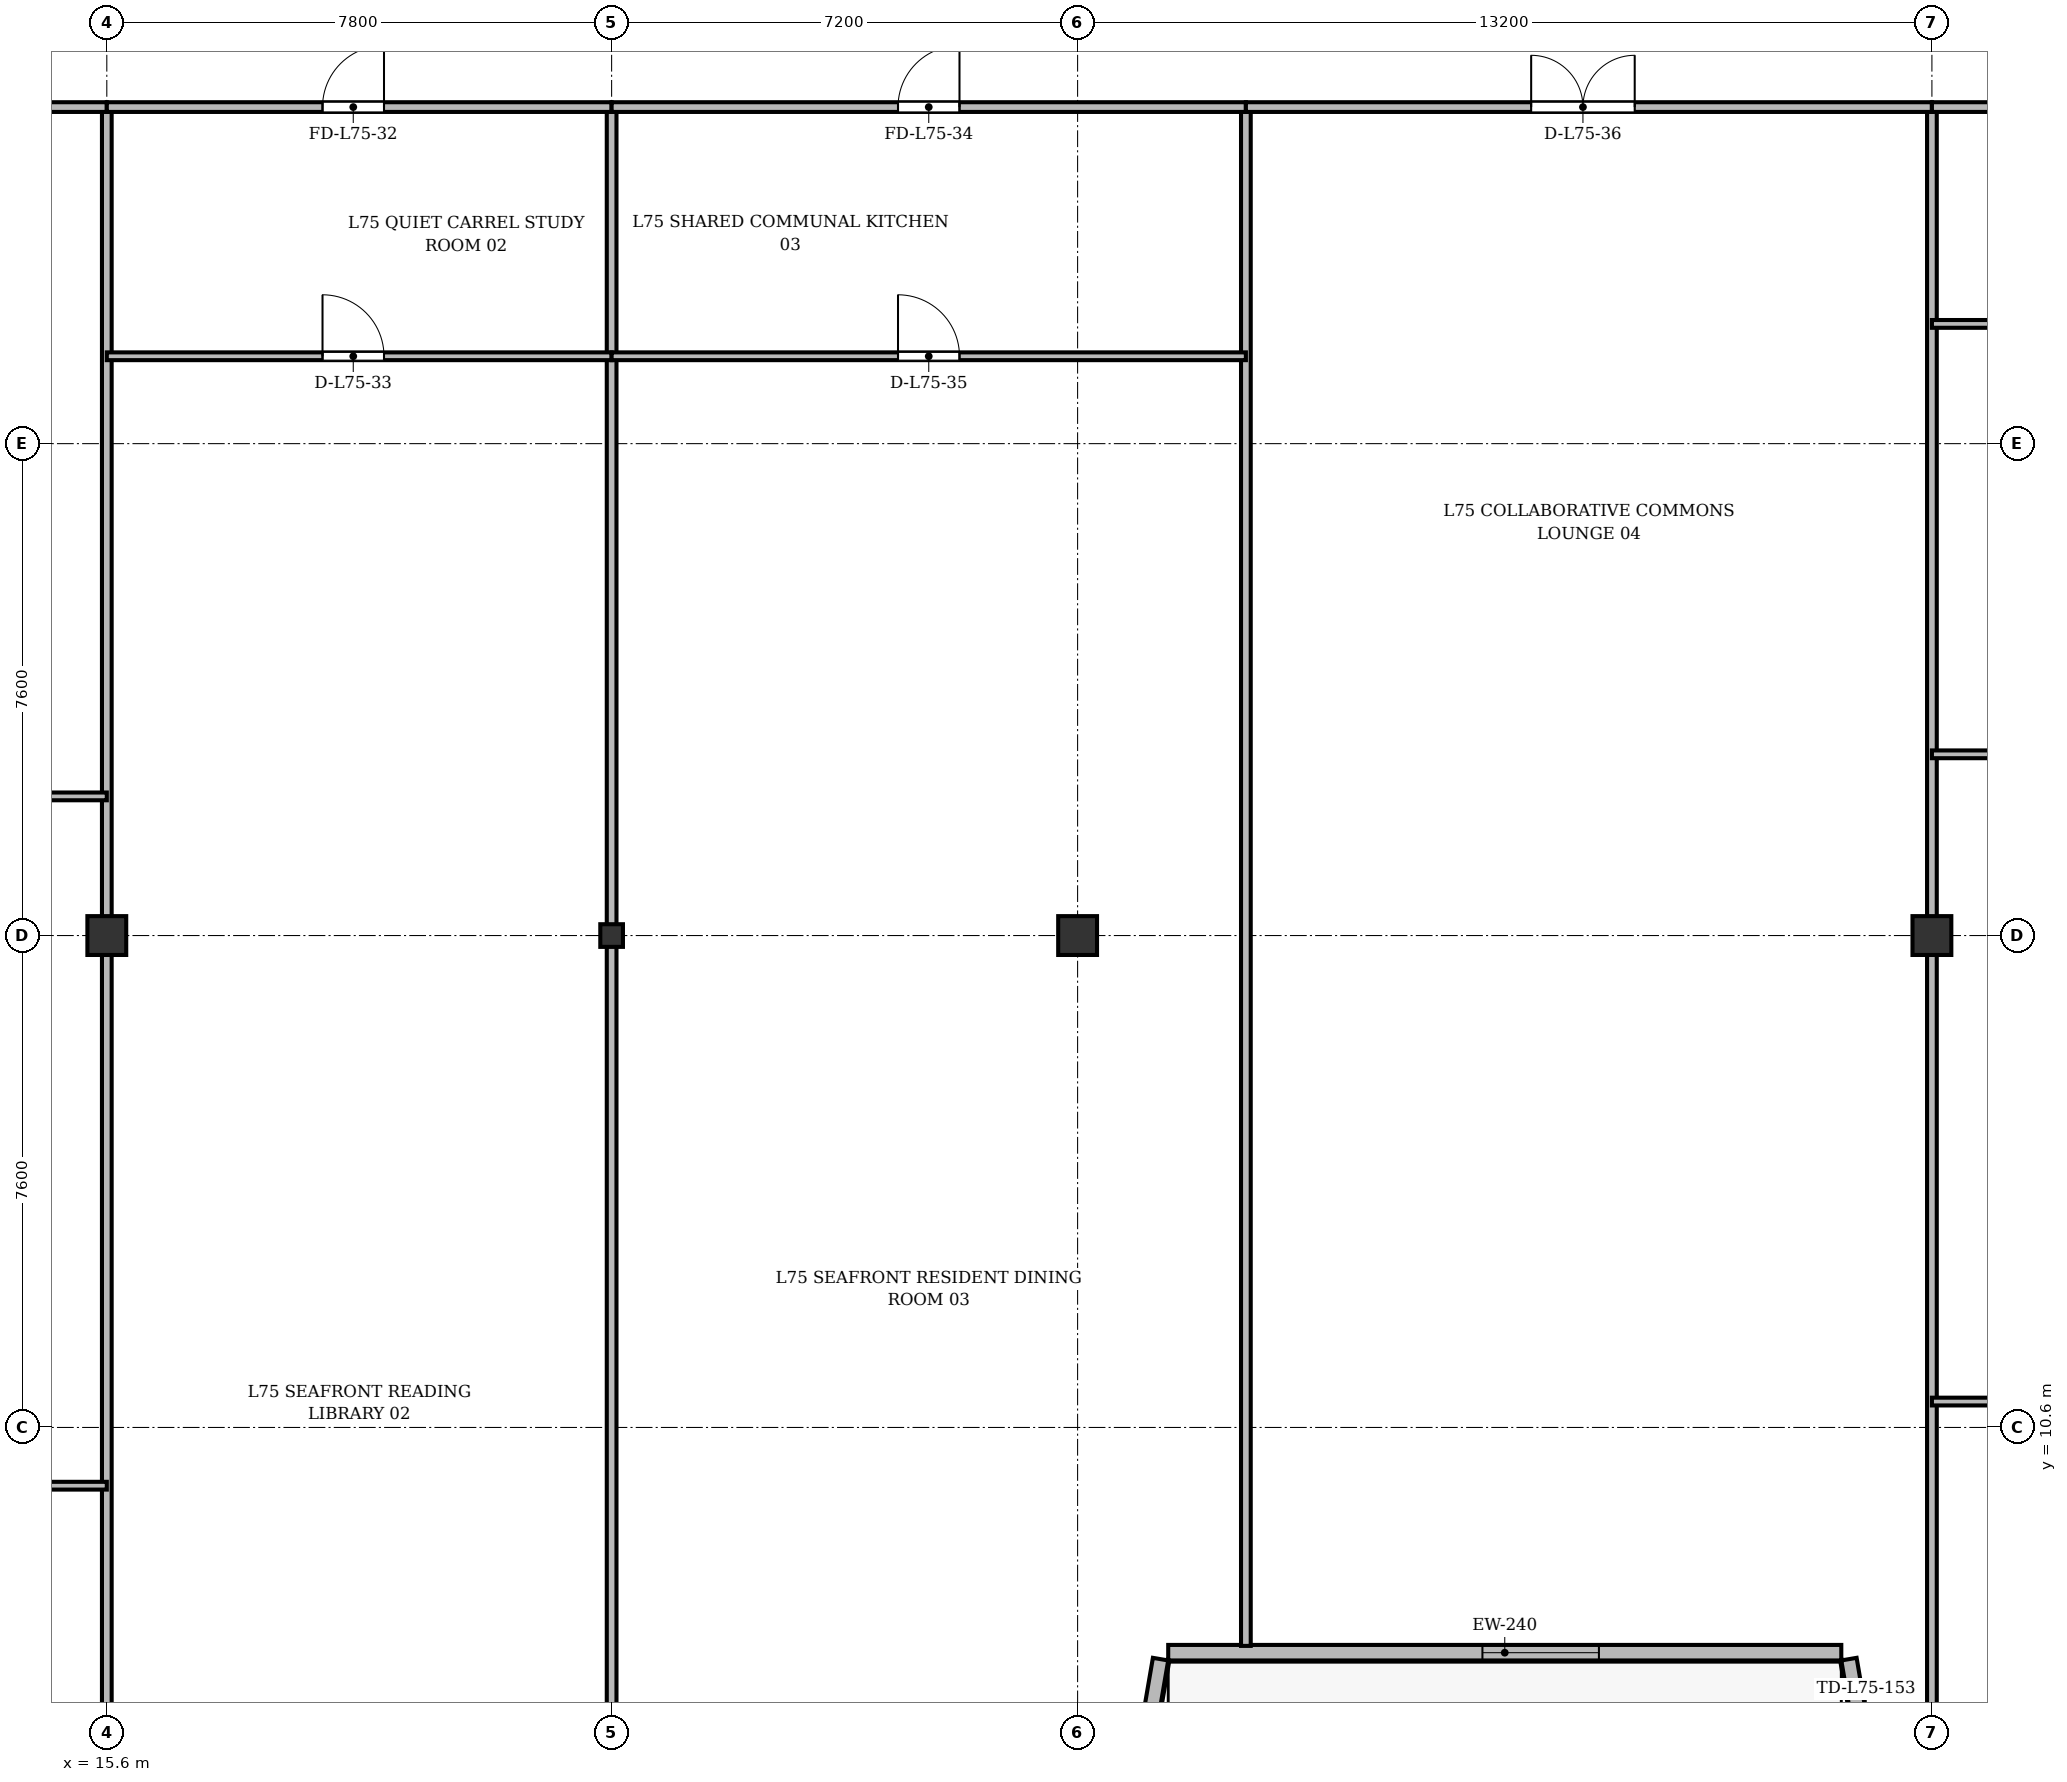
"""IFC4 building model, lengths in metres.
Left out: names, types, materials, properties, quantities, classifications, styles, units other than length and angle.
Written with IfcOpenShell. Run it as: python <this file> out.ifc"""

import sys

from ifc_helpers import new_model, si_unit, direction, frame, frame_2d, origin, origin_2d, place, context, subcontext, project, spatial, rectangle, i_section, extrude, source, transform, mapped, element, fill, save


model = new_model("IFC4")
c1 = context("Model", 3, precision=1e-05, world=origin(), true_north=direction((0.0, 1.0)))
c2 = subcontext(c1, "Body", "Model", "MODEL_VIEW")
j1 = project(units=[si_unit("LENGTHUNIT", "METRE"), si_unit("PLANEANGLEUNIT", "RADIAN")], contexts=[c1])
p1 = place(None, origin())
s1 = spatial("IfcSite", under=j1, at=p1, CompositionType="ELEMENT")
p2 = place(p1, origin())
s2 = spatial("IfcBuilding", under=s1, at=p2, CompositionType="ELEMENT")
p3 = place(p2, frame((0.0, 0.0, 288.3)))
s3 = spatial("IfcBuildingStorey", under=s2, at=p3, CompositionType="ELEMENT", Elevation=288.3)
m1 = source(origin(), c2, "Body", "SweptSolid", [
    extrude(rectangle(XDim=0.6, YDim=0.6, at=origin_2d()), origin(), (0.0, 0.0, 1.0), 3.6),
])
p4 = place(p3, frame((15.6, 18.2, 0.0), z_axis=(0.0, 0.0, 1.0), x_axis=(1.0, 0.0, 0.0)))
e1 = element("IfcColumn", 1, at=p4, inside=s3, PredefinedType="COLUMN", context=c2, shape_type="MappedRepresentation", body=[
    mapped(m1, transform((0.0, 0.0, 0.0), x_axis=(1.0, 0.0, 0.0), y_axis=(0.0, 1.0, 0.0), z_axis=(0.0, 0.0, 1.0), scale=1.0)),
])
m2 = source(origin(), c2, "Body", "SweptSolid", [
    extrude(i_section(OverallWidth=0.35, OverallDepth=0.35, WebThickness=0.018, FlangeThickness=0.028, at=origin_2d()), origin(), (0.0, 0.0, 1.0), 3.6),
])
p5 = place(p3, frame((23.4, 18.2, 0.0), z_axis=(0.0, 0.0, 1.0), x_axis=(1.0, 0.0, 0.0)))
e2 = element("IfcColumn", 2, at=p5, inside=s3, PredefinedType="COLUMN", context=c2, shape_type="MappedRepresentation", body=[
    mapped(m2, transform((0.0, 0.0, 0.0), x_axis=(1.0, 0.0, 0.0), y_axis=(0.0, 1.0, 0.0), z_axis=(0.0, 0.0, 1.0), scale=1.0)),
])
for number, where, z_axis, x_axis in (
    (3, (30.6, 18.2, 0.0), (0.0, 0.0, 1.0), (1.0, 0.0, 0.0)),
    (4, (43.8, 18.2, 0.0), (0.0, 0.0, 1.0), (1.0, 0.0, 0.0)),
):
    element("IfcColumn", number, at=place(p3, frame(where, z_axis=z_axis, x_axis=x_axis)), inside=s3, PredefinedType="COLUMN", context=c2, shape_type="MappedRepresentation", body=[
        mapped(m1, transform((0.0, 0.0, 0.0), x_axis=(1.0, 0.0, 0.0), y_axis=(0.0, 1.0, 0.0), z_axis=(0.0, 0.0, 1.0), scale=1.0)),
    ])
p6 = place(p3, frame((43.118, 3.52, 0.0), z_axis=(0.0, 0.0, 1.0), x_axis=(-0.168990530437, 0.98561767467, 0.0)))
e5 = element("IfcWall", 5, at=p6, inside=s3, PredefinedType="SOLIDWALL", context=c2, shape_type="SweptSolid", body=[
    extrude(rectangle(XDim=3.551, YDim=0.24, at=frame_2d((1.775, 0.0))), origin(), (0.0, 0.0, 1.0), 2.92),
])
p7 = place(p6, frame((1.374, 0.0, 0.0)))
e6 = element("IfcOpeningElement", 6, at=p7, cuts=e5, PredefinedType="OPENING", context=c2, shape_type="SweptSolid", body=[
    extrude(rectangle(XDim=1.2, YDim=2.2, at=frame_2d((0.6, 1.1))), frame((0.0, 0.13, 0.0), z_axis=(0.0, -1.0, 0.0), x_axis=(1.0, 0.0, 0.0)), (0.0, 0.0, 1.0), 0.26),
])
p8 = place(p3, frame((42.4, 7.12, 0.0), z_axis=(0.0, 0.0, 1.0), x_axis=(-1.0, 0.0, 0.0)))
e7 = element("IfcWall", 7, at=p8, inside=s3, PredefinedType="SOLIDWALL", context=c2, shape_type="SweptSolid", body=[
    extrude(rectangle(XDim=10.4, YDim=0.24, at=frame_2d((5.2, 0.0))), origin(), (0.0, 0.0, 1.0), 3.37),
])
p9 = place(p8, frame((3.745, 0.0, 0.9)))
e8 = element("IfcOpeningElement", 8, at=p9, cuts=e7, PredefinedType="OPENING", context=c2, shape_type="SweptSolid", body=[
    extrude(rectangle(XDim=1.8, YDim=1.8, at=frame_2d((0.9, 0.9))), frame((0.0, 0.13, 0.0), z_axis=(0.0, -1.0, 0.0), x_axis=(1.0, 0.0, 0.0)), (0.0, 0.0, 1.0), 0.26),
])
p10 = place(p3, frame((31.882, 7.02, 0.0), z_axis=(0.0, 0.0, 1.0), x_axis=(-0.168923741424, -0.98562912375, 0.0)))
e9 = element("IfcWall", 9, at=p10, inside=s3, PredefinedType="SOLIDWALL", context=c2, shape_type="SweptSolid", body=[
    extrude(rectangle(XDim=3.551, YDim=0.24, at=frame_2d((1.775, 0.0))), origin(), (0.0, 0.0, 1.0), 2.92),
])
for number, where, z_axis, x_axis in (
    (10, (15.6, 3.725, 0.0), (0.0, 0.0, 1.0), (0.0, 1.0, 0.0)),
    (11, (23.4, 3.725, 0.0), (0.0, 0.0, 1.0), (0.0, 1.0, 0.0)),
):
    element("IfcWall", number, at=place(p3, frame(where, z_axis=z_axis, x_axis=x_axis)), inside=s3, PredefinedType="PARTITIONING", context=c2, shape_type="SweptSolid", body=[
        extrude(rectangle(XDim=27.275, YDim=0.15, at=frame_2d((13.637, 0.0))), origin(), (0.0, 0.0, 1.0), 2.87),
    ])
p11 = place(p3, frame((33.2, 7.225, 0.0), z_axis=(0.0, 0.0, 1.0), x_axis=(0.0, 1.0, 0.0)))
e12 = element("IfcWall", 12, at=p11, inside=s3, PredefinedType="PARTITIONING", context=c2, shape_type="SweptSolid", body=[
    extrude(rectangle(XDim=23.775, YDim=0.15, at=frame_2d((11.887, 0.0))), origin(), (0.0, 0.0, 1.0), 2.92),
])
p12 = place(p3, frame((43.8, 3.725, 0.0), z_axis=(0.0, 0.0, 1.0), x_axis=(0.0, 1.0, 0.0)))
e13 = element("IfcWall", 13, at=p12, inside=s3, PredefinedType="PARTITIONING", context=c2, shape_type="SweptSolid", body=[
    extrude(rectangle(XDim=27.275, YDim=0.15, at=frame_2d((13.637, 0.0))), origin(), (0.0, 0.0, 1.0), 2.87),
])
p13 = place(p3, frame((8.44, 20.35, 0.0), z_axis=(0.0, 0.0, 1.0), x_axis=(1.0, 0.0, 0.0)))
e14 = element("IfcWall", 14, at=p13, inside=s3, PredefinedType="PARTITIONING", context=c2, shape_type="SweptSolid", body=[
    extrude(rectangle(XDim=7.16, YDim=0.12, at=frame_2d((3.58, 0.0))), origin(), (0.0, 0.0, 1.0), 2.87),
])
p14 = place(p13, frame((3.105, 0.0, 0.0)))
e15 = element("IfcOpeningElement", 15, at=p14, cuts=e14, PredefinedType="OPENING", context=c2, shape_type="SweptSolid", body=[
    extrude(rectangle(XDim=0.95, YDim=2.15, at=frame_2d((0.475, 1.075))), frame((0.0, 0.07, 0.0), z_axis=(0.0, -1.0, 0.0), x_axis=(1.0, 0.0, 0.0)), (0.0, 0.0, 1.0), 0.14),
])
p15 = place(p3, frame((8.425, 31.0, 0.0), z_axis=(0.0, 0.0, 1.0), x_axis=(1.0, 0.0, 0.0)))
e16 = element("IfcWall", 16, at=p15, inside=s3, PredefinedType="PARTITIONING", context=c2, shape_type="SweptSolid", body=[
    extrude(rectangle(XDim=7.175, YDim=0.15, at=frame_2d((3.587, 0.0))), origin(), (0.0, 0.0, 1.0), 2.87),
])
p16 = place(p15, frame((4.681, 0.0, 0.0)))
e17 = element("IfcOpeningElement", 17, at=p16, cuts=e16, PredefinedType="OPENING", context=c2, shape_type="SweptSolid", body=[
    extrude(rectangle(XDim=0.95, YDim=2.15, at=frame_2d((0.475, 1.075))), frame((0.0, 0.085, 0.0), z_axis=(0.0, -1.0, 0.0), x_axis=(1.0, 0.0, 0.0)), (0.0, 0.0, 1.0), 0.17),
])
p17 = place(p3, frame((8.44, 9.7, 0.0), z_axis=(0.0, 0.0, 1.0), x_axis=(1.0, 0.0, 0.0)))
e18 = element("IfcWall", 18, at=p17, inside=s3, PredefinedType="PARTITIONING", context=c2, shape_type="SweptSolid", body=[
    extrude(rectangle(XDim=7.16, YDim=0.12, at=frame_2d((3.58, 0.0))), origin(), (0.0, 0.0, 1.0), 2.87),
])
p18 = place(p17, frame((3.105, 0.0, 0.0)))
e19 = element("IfcOpeningElement", 19, at=p18, cuts=e18, PredefinedType="OPENING", context=c2, shape_type="SweptSolid", body=[
    extrude(rectangle(XDim=0.95, YDim=2.15, at=frame_2d((0.475, 1.075))), frame((0.0, 0.07, 0.0), z_axis=(0.0, -1.0, 0.0), x_axis=(1.0, 0.0, 0.0)), (0.0, 0.0, 1.0), 0.14),
])
p19 = place(p3, frame((15.6, 31.0, 0.0), z_axis=(0.0, 0.0, 1.0), x_axis=(1.0, 0.0, 0.0)))
e20 = element("IfcWall", 20, at=p19, inside=s3, PredefinedType="PARTITIONING", context=c2, shape_type="SweptSolid", body=[
    extrude(rectangle(XDim=7.8, YDim=0.15, at=frame_2d((3.9, 0.0))), origin(), (0.0, 0.0, 1.0), 2.87),
])
p20 = place(p19, frame((3.333, 0.0, 0.0)))
e21 = element("IfcOpeningElement", 21, at=p20, cuts=e20, PredefinedType="OPENING", context=c2, shape_type="SweptSolid", body=[
    extrude(rectangle(XDim=0.95, YDim=2.15, at=frame_2d((0.475, 1.075))), frame((0.0, 0.085, 0.0), z_axis=(0.0, -1.0, 0.0), x_axis=(1.0, 0.0, 0.0)), (0.0, 0.0, 1.0), 0.17),
])
p21 = place(p3, frame((15.6, 27.15, 0.0), z_axis=(0.0, 0.0, 1.0), x_axis=(1.0, 0.0, 0.0)))
e22 = element("IfcWall", 22, at=p21, inside=s3, PredefinedType="PARTITIONING", context=c2, shape_type="SweptSolid", body=[
    extrude(rectangle(XDim=7.8, YDim=0.12, at=frame_2d((3.9, 0.0))), origin(), (0.0, 0.0, 1.0), 2.87),
])
p22 = place(p21, frame((3.333, 0.0, 0.0)))
e23 = element("IfcOpeningElement", 23, at=p22, cuts=e22, PredefinedType="OPENING", context=c2, shape_type="SweptSolid", body=[
    extrude(rectangle(XDim=0.95, YDim=2.15, at=frame_2d((0.475, 1.075))), frame((0.0, 0.07, 0.0), z_axis=(0.0, -1.0, 0.0), x_axis=(1.0, 0.0, 0.0)), (0.0, 0.0, 1.0), 0.14),
])
p23 = place(p3, frame((23.4, 31.0, 0.0), z_axis=(0.0, 0.0, 1.0), x_axis=(1.0, 0.0, 0.0)))
e24 = element("IfcWall", 24, at=p23, inside=s3, PredefinedType="PARTITIONING", context=c2, shape_type="SweptSolid", body=[
    extrude(rectangle(XDim=9.8, YDim=0.15, at=frame_2d((4.9, 0.0))), origin(), (0.0, 0.0, 1.0), 2.87),
])
p24 = place(p23, frame((4.425, 0.0, 0.0)))
e25 = element("IfcOpeningElement", 25, at=p24, cuts=e24, PredefinedType="OPENING", context=c2, shape_type="SweptSolid", body=[
    extrude(rectangle(XDim=0.95, YDim=2.15, at=frame_2d((0.475, 1.075))), frame((0.0, 0.085, 0.0), z_axis=(0.0, -1.0, 0.0), x_axis=(1.0, 0.0, 0.0)), (0.0, 0.0, 1.0), 0.17),
])
p25 = place(p3, frame((23.4, 27.15, 0.0), z_axis=(0.0, 0.0, 1.0), x_axis=(1.0, 0.0, 0.0)))
e26 = element("IfcWall", 26, at=p25, inside=s3, PredefinedType="PARTITIONING", context=c2, shape_type="SweptSolid", body=[
    extrude(rectangle(XDim=9.8, YDim=0.12, at=frame_2d((4.9, 0.0))), origin(), (0.0, 0.0, 1.0), 2.87),
])
p26 = place(p25, frame((4.425, 0.0, 0.0)))
e27 = element("IfcOpeningElement", 27, at=p26, cuts=e26, PredefinedType="OPENING", context=c2, shape_type="SweptSolid", body=[
    extrude(rectangle(XDim=0.95, YDim=2.15, at=frame_2d((0.475, 1.075))), frame((0.0, 0.07, 0.0), z_axis=(0.0, -1.0, 0.0), x_axis=(1.0, 0.0, 0.0)), (0.0, 0.0, 1.0), 0.14),
])
p27 = place(p3, frame((33.2, 31.0, 0.0), z_axis=(0.0, 0.0, 1.0), x_axis=(1.0, 0.0, 0.0)))
e28 = element("IfcWall", 28, at=p27, inside=s3, PredefinedType="PARTITIONING", context=c2, shape_type="SweptSolid", body=[
    extrude(rectangle(XDim=10.6, YDim=0.15, at=frame_2d((5.3, 0.0))), origin(), (0.0, 0.0, 1.0), 2.87),
])
p28 = place(p27, frame((4.408, 0.0, 0.0)))
e29 = element("IfcOpeningElement", 29, at=p28, cuts=e28, PredefinedType="OPENING", context=c2, shape_type="SweptSolid", body=[
    extrude(rectangle(XDim=1.6, YDim=2.2, at=frame_2d((0.8, 1.1))), frame((0.0, 0.085, 0.0), z_axis=(0.0, -1.0, 0.0), x_axis=(1.0, 0.0, 0.0)), (0.0, 0.0, 1.0), 0.17),
])
p29 = place(p3, frame((43.8, 21.0, 0.0), z_axis=(0.0, 0.0, 1.0), x_axis=(1.0, 0.0, 0.0)))
e30 = element("IfcWall", 30, at=p29, inside=s3, PredefinedType="PARTITIONING", context=c2, shape_type="SweptSolid", body=[
    extrude(rectangle(XDim=7.2, YDim=0.12, at=frame_2d((3.6, 0.0))), origin(), (0.0, 0.0, 1.0), 2.87),
])
p30 = place(p29, frame((3.125, 0.0, 0.0)))
e31 = element("IfcOpeningElement", 31, at=p30, cuts=e30, PredefinedType="OPENING", context=c2, shape_type="SweptSolid", body=[
    extrude(rectangle(XDim=0.95, YDim=2.15, at=frame_2d((0.475, 1.075))), frame((0.0, 0.07, 0.0), z_axis=(0.0, -1.0, 0.0), x_axis=(1.0, 0.0, 0.0)), (0.0, 0.0, 1.0), 0.14),
])
p31 = place(p3, frame((43.8, 27.65, 0.0), z_axis=(0.0, 0.0, 1.0), x_axis=(1.0, 0.0, 0.0)))
e32 = element("IfcWall", 32, at=p31, inside=s3, PredefinedType="PARTITIONING", context=c2, shape_type="SweptSolid", body=[
    extrude(rectangle(XDim=2.4, YDim=0.12, at=frame_2d((1.2, 0.0))), origin(), (0.0, 0.0, 1.0), 2.87),
])
p32 = place(p3, frame((43.8, 31.0, 0.0), z_axis=(0.0, 0.0, 1.0), x_axis=(1.0, 0.0, 0.0)))
e33 = element("IfcWall", 33, at=p32, inside=s3, PredefinedType="PARTITIONING", context=c2, shape_type="SweptSolid", body=[
    extrude(rectangle(XDim=7.2, YDim=0.15, at=frame_2d((3.6, 0.0))), origin(), (0.0, 0.0, 1.0), 2.87),
])
p33 = place(p32, frame((4.706, 0.0, 0.0)))
e34 = element("IfcOpeningElement", 34, at=p33, cuts=e33, PredefinedType="OPENING", context=c2, shape_type="SweptSolid", body=[
    extrude(rectangle(XDim=0.95, YDim=2.15, at=frame_2d((0.475, 1.075))), frame((0.0, 0.085, 0.0), z_axis=(0.0, -1.0, 0.0), x_axis=(1.0, 0.0, 0.0)), (0.0, 0.0, 1.0), 0.17),
])
p34 = place(p3, frame((43.8, 11.0, 0.0), z_axis=(0.0, 0.0, 1.0), x_axis=(1.0, 0.0, 0.0)))
e35 = element("IfcWall", 35, at=p34, inside=s3, PredefinedType="PARTITIONING", context=c2, shape_type="SweptSolid", body=[
    extrude(rectangle(XDim=3.6, YDim=0.12, at=frame_2d((1.8, 0.0))), origin(), (0.0, 0.0, 1.0), 2.87),
])
p35 = place(p34, frame((1.325, 0.0, 0.0)))
e36 = element("IfcOpeningElement", 36, at=p35, cuts=e35, PredefinedType="OPENING", context=c2, shape_type="SweptSolid", body=[
    extrude(rectangle(XDim=0.95, YDim=2.15, at=frame_2d((0.475, 1.075))), frame((0.0, 0.07, 0.0), z_axis=(0.0, -1.0, 0.0), x_axis=(1.0, 0.0, 0.0)), (0.0, 0.0, 1.0), 0.14),
])
m3 = source(origin(), c2, "Body", "SweptSolid", [
    extrude(rectangle(XDim=1.8, YDim=1.8, at=frame_2d((0.9, 0.9))), frame((0.0, 0.03, 0.0), z_axis=(0.0, -1.0, 0.0), x_axis=(1.0, 0.0, 0.0)), (0.0, 0.0, 1.0), 0.06),
])
p36 = place(p9, origin())
e37 = element("IfcWindow", 37, at=p36, inside=s3, PartitioningType="SINGLE_PANEL", PredefinedType="WINDOW", context=c2, shape_type="MappedRepresentation", body=[
    mapped(m3, transform((0.0, 0.0, 0.0), x_axis=(1.0, 0.0, 0.0), y_axis=(0.0, 1.0, 0.0), z_axis=(0.0, 0.0, 1.0), scale=1.0)),
])
fill(e8, e37)
m4 = source(origin(), c2, "Body", "SweptSolid", [
    extrude(rectangle(XDim=0.95, YDim=2.15, at=frame_2d((0.475, 1.075))), frame((0.0, 0.025, 0.0), z_axis=(0.0, -1.0, 0.0), x_axis=(1.0, 0.0, 0.0)), (0.0, 0.0, 1.0), 0.05),
])
p37 = place(p20, origin())
e38 = element("IfcDoor", 38, at=p37, inside=s3, OperationType="SINGLE_SWING_RIGHT", PredefinedType="DOOR", context=c2, shape_type="MappedRepresentation", body=[
    mapped(m4, transform((0.0, 0.0, 0.0), x_axis=(1.0, 0.0, 0.0), y_axis=(0.0, 1.0, 0.0), z_axis=(0.0, 0.0, 1.0), scale=1.0)),
])
fill(e21, e38)
p38 = place(p22, origin())
e39 = element("IfcDoor", 39, at=p38, inside=s3, OperationType="SINGLE_SWING_LEFT", PredefinedType="DOOR", context=c2, shape_type="MappedRepresentation", body=[
    mapped(m4, transform((0.0, 0.0, 0.0), x_axis=(1.0, 0.0, 0.0), y_axis=(0.0, 1.0, 0.0), z_axis=(0.0, 0.0, 1.0), scale=1.0)),
])
fill(e23, e39)
p39 = place(p24, origin())
e40 = element("IfcDoor", 40, at=p39, inside=s3, OperationType="SINGLE_SWING_RIGHT", PredefinedType="DOOR", context=c2, shape_type="MappedRepresentation", body=[
    mapped(m4, transform((0.0, 0.0, 0.0), x_axis=(1.0, 0.0, 0.0), y_axis=(0.0, 1.0, 0.0), z_axis=(0.0, 0.0, 1.0), scale=1.0)),
])
fill(e25, e40)
p40 = place(p26, origin())
e41 = element("IfcDoor", 41, at=p40, inside=s3, OperationType="SINGLE_SWING_LEFT", PredefinedType="DOOR", context=c2, shape_type="MappedRepresentation", body=[
    mapped(m4, transform((0.0, 0.0, 0.0), x_axis=(1.0, 0.0, 0.0), y_axis=(0.0, 1.0, 0.0), z_axis=(0.0, 0.0, 1.0), scale=1.0)),
])
fill(e27, e41)
m5 = source(origin(), c2, "Body", "SweptSolid", [
    extrude(rectangle(XDim=1.6, YDim=2.2, at=frame_2d((0.8, 1.1))), frame((0.0, 0.025, 0.0), z_axis=(0.0, -1.0, 0.0), x_axis=(1.0, 0.0, 0.0)), (0.0, 0.0, 1.0), 0.05),
])
p41 = place(p28, origin())
e42 = element("IfcDoor", 42, at=p41, inside=s3, OperationType="DOUBLE_DOOR_SINGLE_SWING", PredefinedType="DOOR", context=c2, shape_type="MappedRepresentation", body=[
    mapped(m5, transform((0.0, 0.0, 0.0), x_axis=(1.0, 0.0, 0.0), y_axis=(0.0, 1.0, 0.0), z_axis=(0.0, 0.0, 1.0), scale=1.0)),
])
fill(e29, e42)
save(model, sys.argv[1])
